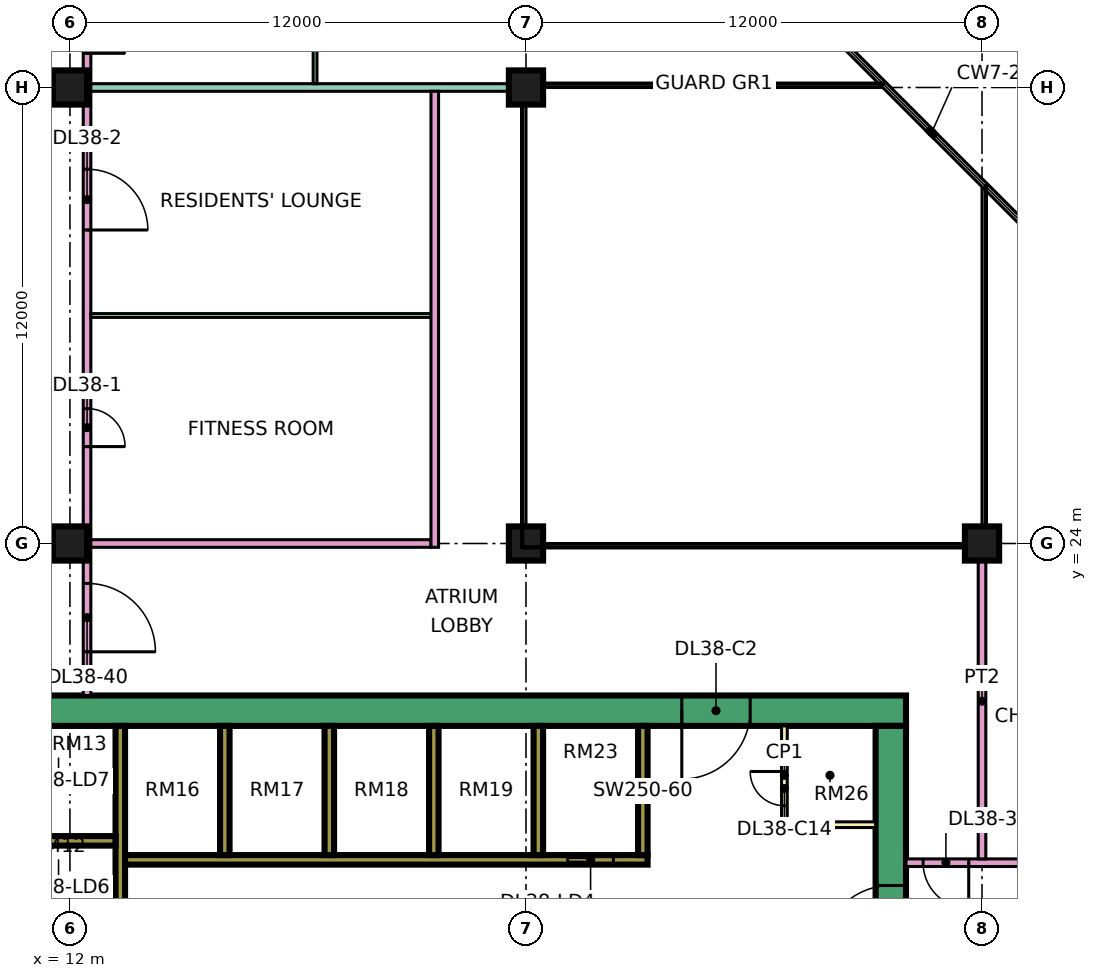
"""IFC4 building model, lengths in metres.
Left out: names, types, materials, properties, quantities, classifications, styles, units other than length and angle.
Written with IfcOpenShell. Run it as: python <this file> out.ifc"""

import sys

from ifc_helpers import new_model, si_unit, direction, frame, frame_2d, origin, origin_2d, place, context, subcontext, project, spatial, rectangle, extrude, element, fill, save


model = new_model("IFC4")
c1 = context("Model", 3, precision=1e-05, world=origin(), true_north=direction((0.0, 1.0)))
c2 = subcontext(c1, "Body", "Model", "MODEL_VIEW")
j1 = project(units=[si_unit("LENGTHUNIT", "METRE"), si_unit("PLANEANGLEUNIT", "RADIAN")], contexts=[c1])
p1 = place(None, origin())
s1 = spatial("IfcSite", under=j1, at=p1, CompositionType="ELEMENT")
p2 = place(p1, origin())
s2 = spatial("IfcBuilding", under=s1, at=p2, CompositionType="ELEMENT")
p3 = place(p2, frame((0.0, 0.0, 168.65)))
s3 = spatial("IfcBuildingStorey", under=s2, at=p3, CompositionType="ELEMENT", Elevation=168.65)
for number, where, z_axis, x_axis in (
    (1, (12.0, 24.0, 0.0), (0.0, 0.0, 1.0), (1.0, 0.0, 0.0)),
    (2, (12.0, 36.0, 0.0), (0.0, 0.0, 1.0), (1.0, 0.0, 0.0)),
    (3, (24.0, 24.0, 0.0), (0.0, 0.0, 1.0), (1.0, 0.0, 0.0)),
    (4, (24.0, 36.0, 0.0), (0.0, 0.0, 1.0), (1.0, 0.0, 0.0)),
    (5, (36.0, 24.0, 0.0), (0.0, 0.0, 1.0), (1.0, 0.0, 0.0)),
):
    element("IfcColumn", number, at=place(p3, frame(where, z_axis=z_axis, x_axis=x_axis)), inside=s3, PredefinedType="COLUMN", context=c2, shape_type="SweptSolid", body=[
        extrude(rectangle(XDim=0.9, YDim=0.9, at=origin_2d()), origin(), (0.0, 0.0, 1.0), 3.75),
    ])
p4 = place(p3, frame((9.0, 19.6, 0.0), z_axis=(0.0, 0.0, 1.0), x_axis=(1.0, 0.0, 0.0)))
e6 = element("IfcWall", 6, at=p4, inside=s3, PredefinedType="SHEAR", context=c2, shape_type="SweptSolid", body=[
    extrude(rectangle(XDim=25.0, YDim=0.8, at=frame_2d((12.5, 0.0))), origin(), (0.0, 0.0, 1.0), 3.75),
])
p5 = place(p4, frame((19.1, 0.0, 0.0)))
e7 = element("IfcOpeningElement", 7, at=p5, cuts=e6, PredefinedType="OPENING", context=c2, shape_type="SweptSolid", body=[
    extrude(rectangle(XDim=1.8, YDim=2.4, at=frame_2d((0.9, 1.2))), frame((0.0, 0.41, 0.0), z_axis=(0.0, -1.0, 0.0), x_axis=(1.0, 0.0, 0.0)), (0.0, 0.0, 1.0), 0.82),
])
p6 = place(p3, frame((33.6, 7.8, 0.0), z_axis=(0.0, 0.0, 1.0), x_axis=(0.0, 1.0, 0.0)))
e8 = element("IfcWall", 8, at=p6, inside=s3, PredefinedType="SHEAR", context=c2, shape_type="SweptSolid", body=[
    extrude(rectangle(XDim=11.4, YDim=0.8, at=frame_2d((5.7, 0.0))), origin(), (0.0, 0.0, 1.0), 3.75),
])
p7 = place(p6, frame((5.4, 0.0, 0.0)))
e9 = element("IfcOpeningElement", 9, at=p7, cuts=e8, PredefinedType="OPENING", context=c2, shape_type="SweptSolid", body=[
    extrude(rectangle(XDim=1.8, YDim=2.4, at=frame_2d((0.9, 1.2))), frame((0.0, 0.41, 0.0), z_axis=(0.0, -1.0, 0.0), x_axis=(1.0, 0.0, 0.0)), (0.0, 0.0, 1.0), 0.82),
])
p8 = place(p3, frame((13.325, 7.8, 0.0), z_axis=(0.0, 0.0, 1.0), x_axis=(0.0, 1.0, 0.0)))
e10 = element("IfcWall", 10, at=p8, inside=s3, PredefinedType="SHEAR", context=c2, shape_type="SweptSolid", body=[
    extrude(rectangle(XDim=11.4, YDim=0.25, at=frame_2d((5.7, 0.0))), origin(), (0.0, 0.0, 1.0), 3.75),
])
p9 = place(p3, frame((13.45, 15.675, 0.0), z_axis=(0.0, 0.0, 1.0), x_axis=(1.0, 0.0, 0.0)))
e11 = element("IfcWall", 11, at=p9, inside=s3, PredefinedType="SHEAR", context=c2, shape_type="SweptSolid", body=[
    extrude(rectangle(XDim=13.75, YDim=0.25, at=frame_2d((6.875, 0.0))), origin(), (0.0, 0.0, 1.0), 3.75),
])
p10 = place(p9, frame((11.65, 0.0, 0.0)))
e12 = element("IfcOpeningElement", 12, at=p10, cuts=e11, PredefinedType="OPENING", context=c2, shape_type="SweptSolid", body=[
    extrude(rectangle(XDim=1.2, YDim=2.2, at=frame_2d((0.6, 1.1))), frame((0.0, 0.135, 0.0), z_axis=(0.0, -1.0, 0.0), x_axis=(1.0, 0.0, 0.0)), (0.0, 0.0, 1.0), 0.27),
])
p11 = place(p3, frame((10.2, 16.175, 0.0), z_axis=(0.0, 0.0, 1.0), x_axis=(1.0, 0.0, 0.0)))
e13 = element("IfcWall", 13, at=p11, inside=s3, PredefinedType="SHEAR", context=c2, shape_type="SweptSolid", body=[
    extrude(rectangle(XDim=3.0, YDim=0.25, at=frame_2d((1.5, 0.0))), origin(), (0.0, 0.0, 1.0), 3.75),
])
for number, where, z_axis, x_axis in (
    (14, (16.075, 15.8, 0.0), (0.0, 0.0, 1.0), (0.0, 1.0, 0.0)),
    (15, (18.825, 15.8, 0.0), (0.0, 0.0, 1.0), (0.0, 1.0, 0.0)),
    (16, (21.575, 15.8, 0.0), (0.0, 0.0, 1.0), (0.0, 1.0, 0.0)),
    (17, (24.325, 15.8, 0.0), (0.0, 0.0, 1.0), (0.0, 1.0, 0.0)),
    (18, (27.075, 15.8, 0.0), (0.0, 0.0, 1.0), (0.0, 1.0, 0.0)),
):
    element("IfcWall", number, at=place(p3, frame(where, z_axis=z_axis, x_axis=x_axis)), inside=s3, PredefinedType="SHEAR", context=c2, shape_type="SweptSolid", body=[
        extrude(rectangle(XDim=3.4, YDim=0.25, at=frame_2d((1.7, 0.0))), origin(), (0.0, 0.0, 1.0), 3.75),
    ])
p12 = place(p3, frame((30.8, 16.6, 0.0), z_axis=(0.0, 0.0, 1.0), x_axis=(0.0, 1.0, 0.0)))
e19 = element("IfcWall", 19, at=p12, inside=s3, PredefinedType="PARTITIONING", context=c2, shape_type="SweptSolid", body=[
    extrude(rectangle(XDim=2.6, YDim=0.15, at=frame_2d((1.3, 0.0))), origin(), (0.0, 0.0, 1.0), 3.35),
])
p13 = place(p12, frame((0.5, 0.0, 0.0)))
e20 = element("IfcOpeningElement", 20, at=p13, cuts=e19, PredefinedType="OPENING", context=c2, shape_type="SweptSolid", body=[
    extrude(rectangle(XDim=0.9, YDim=2.1, at=frame_2d((0.45, 1.05))), frame((0.0, 0.085, 0.0), z_axis=(0.0, -1.0, 0.0), x_axis=(1.0, 0.0, 0.0)), (0.0, 0.0, 1.0), 0.17),
])
p14 = place(p3, frame((30.8, 16.6, 0.0), z_axis=(0.0, 0.0, 1.0), x_axis=(1.0, 0.0, 0.0)))
e21 = element("IfcWall", 21, at=p14, inside=s3, PredefinedType="PARTITIONING", context=c2, shape_type="SweptSolid", body=[
    extrude(rectangle(XDim=2.4, YDim=0.15, at=frame_2d((1.2, 0.0))), origin(), (0.0, 0.0, 1.0), 3.35),
])
p15 = place(p3, frame((12.45, 20.0, 0.0), z_axis=(0.0, 0.0, 1.0), x_axis=(0.0, 1.0, 0.0)))
e22 = element("IfcWall", 22, at=p15, inside=s3, PredefinedType="PARTITIONING", context=c2, shape_type="SweptSolid", body=[
    extrude(rectangle(XDim=42.926, YDim=0.2, at=frame_2d((21.463, 0.0))), origin(), (0.0, 0.0, 1.0), 3.35),
])
p16 = place(p15, frame((6.55, 0.0, 0.0)))
e23 = element("IfcOpeningElement", 23, at=p16, cuts=e22, PredefinedType="OPENING", context=c2, shape_type="SweptSolid", body=[
    extrude(rectangle(XDim=1.0, YDim=2.1, at=frame_2d((0.5, 1.05))), frame((0.0, 0.11, 0.0), z_axis=(0.0, -1.0, 0.0), x_axis=(1.0, 0.0, 0.0)), (0.0, 0.0, 1.0), 0.22),
])
p17 = place(p15, frame((12.25, 0.0, 0.0)))
e24 = element("IfcOpeningElement", 24, at=p17, cuts=e22, PredefinedType="OPENING", context=c2, shape_type="SweptSolid", body=[
    extrude(rectangle(XDim=1.6, YDim=2.1, at=frame_2d((0.8, 1.05))), frame((0.0, 0.11, 0.0), z_axis=(0.0, -1.0, 0.0), x_axis=(1.0, 0.0, 0.0)), (0.0, 0.0, 1.0), 0.22),
])
p18 = place(p15, frame((16.9, 0.0, 0.0)))
e25 = element("IfcOpeningElement", 25, at=p18, cuts=e22, PredefinedType="OPENING", context=c2, shape_type="SweptSolid", body=[
    extrude(rectangle(XDim=1.0, YDim=2.1, at=frame_2d((0.5, 1.05))), frame((0.0, 0.11, 0.0), z_axis=(0.0, -1.0, 0.0), x_axis=(1.0, 0.0, 0.0)), (0.0, 0.0, 1.0), 0.22),
])
p19 = place(p15, frame((40.9, 0.0, 0.0)))
e26 = element("IfcOpeningElement", 26, at=p19, cuts=e22, PredefinedType="OPENING", context=c2, shape_type="SweptSolid", body=[
    extrude(rectangle(XDim=1.0, YDim=2.1, at=frame_2d((0.5, 1.05))), frame((0.0, 0.11, 0.0), z_axis=(0.0, -1.0, 0.0), x_axis=(1.0, 0.0, 0.0)), (0.0, 0.0, 1.0), 0.22),
])
p20 = place(p15, frame((1.15, 0.0, 0.0)))
e27 = element("IfcOpeningElement", 27, at=p20, cuts=e22, PredefinedType="OPENING", context=c2, shape_type="SweptSolid", body=[
    extrude(rectangle(XDim=1.8, YDim=2.1, at=frame_2d((0.9, 1.05))), frame((0.0, 0.11, 0.0), z_axis=(0.0, -1.0, 0.0), x_axis=(1.0, 0.0, 0.0)), (0.0, 0.0, 1.0), 0.22),
])
p21 = place(p15, frame((28.6, 0.0, 0.0)))
e28 = element("IfcOpeningElement", 28, at=p21, cuts=e22, PredefinedType="OPENING", context=c2, shape_type="SweptSolid", body=[
    extrude(rectangle(XDim=1.8, YDim=2.1, at=frame_2d((0.9, 1.05))), frame((0.0, 0.11, 0.0), z_axis=(0.0, -1.0, 0.0), x_axis=(1.0, 0.0, 0.0)), (0.0, 0.0, 1.0), 0.22),
])
p22 = place(p3, frame((12.55, 24.0, 0.0), z_axis=(0.0, 0.0, 1.0), x_axis=(1.0, 0.0, 0.0)))
e29 = element("IfcWall", 29, at=p22, inside=s3, PredefinedType="PARTITIONING", context=c2, shape_type="SweptSolid", body=[
    extrude(rectangle(XDim=8.95, YDim=0.2, at=frame_2d((4.475, 0.0))), origin(), (0.0, 0.0, 1.0), 3.35),
])
p23 = place(p3, frame((12.55, 30.0, 0.0), z_axis=(0.0, 0.0, 1.0), x_axis=(1.0, 0.0, 0.0)))
e30 = element("IfcWall", 30, at=p23, inside=s3, PredefinedType="PARTITIONING", context=c2, shape_type="SweptSolid", body=[
    extrude(rectangle(XDim=8.95, YDim=0.1, at=frame_2d((4.475, 0.0))), origin(), (0.0, 0.0, 1.0), 3.35),
])
p24 = place(p3, frame((12.55, 36.0, 0.0), z_axis=(0.0, 0.0, 1.0), x_axis=(1.0, 0.0, 0.0)))
e31 = element("IfcWall", 31, at=p24, inside=s3, PredefinedType="PARTITIONING", context=c2, shape_type="SweptSolid", body=[
    extrude(rectangle(XDim=11.45, YDim=0.2, at=frame_2d((5.725, 0.0))), origin(), (0.0, 0.0, 1.0), 3.35),
])
p25 = place(p3, frame((18.45, 36.1, 0.0), z_axis=(0.0, 0.0, 1.0), x_axis=(0.0, 1.0, 0.0)))
e32 = element("IfcWall", 32, at=p25, inside=s3, PredefinedType="PARTITIONING", context=c2, shape_type="SweptSolid", body=[
    extrude(rectangle(XDim=5.95, YDim=0.1, at=frame_2d((2.975, 0.0))), origin(), (0.0, 0.0, 1.0), 3.35),
])
p26 = place(p25, frame((0.95, 0.0, 0.0)))
e33 = element("IfcOpeningElement", 33, at=p26, cuts=e32, PredefinedType="OPENING", context=c2, shape_type="SweptSolid", body=[
    extrude(rectangle(XDim=0.9, YDim=2.1, at=frame_2d((0.45, 1.05))), frame((0.0, 0.06, 0.0), z_axis=(0.0, -1.0, 0.0), x_axis=(1.0, 0.0, 0.0)), (0.0, 0.0, 1.0), 0.12),
])
p27 = place(p25, frame((3.95, 0.0, 0.0)))
e34 = element("IfcOpeningElement", 34, at=p27, cuts=e32, PredefinedType="OPENING", context=c2, shape_type="SweptSolid", body=[
    extrude(rectangle(XDim=0.9, YDim=2.1, at=frame_2d((0.45, 1.05))), frame((0.0, 0.06, 0.0), z_axis=(0.0, -1.0, 0.0), x_axis=(1.0, 0.0, 0.0)), (0.0, 0.0, 1.0), 0.12),
])
p28 = place(p3, frame((21.6, 23.9, 0.0), z_axis=(0.0, 0.0, 1.0), x_axis=(0.0, 1.0, 0.0)))
e35 = element("IfcWall", 35, at=p28, inside=s3, PredefinedType="PARTITIONING", context=c2, shape_type="SweptSolid", body=[
    extrude(rectangle(XDim=12.0, YDim=0.2, at=frame_2d((6.0, 0.0))), origin(), (0.0, 0.0, 1.0), 3.35),
])
p29 = place(p3, frame((34.0, 15.6, 0.0), z_axis=(0.0, 0.0, 1.0), x_axis=(1.0, 0.0, 0.0)))
e36 = element("IfcWall", 36, at=p29, inside=s3, PredefinedType="PARTITIONING", context=c2, shape_type="SweptSolid", body=[
    extrude(rectangle(XDim=10.35, YDim=0.2, at=frame_2d((5.175, 0.0))), origin(), (0.0, 0.0, 1.0), 3.35),
])
p30 = place(p29, frame((5.6, 0.0, 0.0)))
e37 = element("IfcOpeningElement", 37, at=p30, cuts=e36, PredefinedType="OPENING", context=c2, shape_type="SweptSolid", body=[
    extrude(rectangle(XDim=1.0, YDim=2.1, at=frame_2d((0.5, 1.05))), frame((0.0, 0.11, 0.0), z_axis=(0.0, -1.0, 0.0), x_axis=(1.0, 0.0, 0.0)), (0.0, 0.0, 1.0), 0.22),
])
p31 = place(p29, frame((0.45, 0.0, 0.0)))
e38 = element("IfcOpeningElement", 38, at=p31, cuts=e36, PredefinedType="OPENING", context=c2, shape_type="SweptSolid", body=[
    extrude(rectangle(XDim=1.2, YDim=2.1, at=frame_2d((0.6, 1.05))), frame((0.0, 0.11, 0.0), z_axis=(0.0, -1.0, 0.0), x_axis=(1.0, 0.0, 0.0)), (0.0, 0.0, 1.0), 0.22),
])
p32 = place(p3, frame((36.0, 15.7, 0.0), z_axis=(0.0, 0.0, 1.0), x_axis=(0.0, 1.0, 0.0)))
e39 = element("IfcWall", 39, at=p32, inside=s3, PredefinedType="PARTITIONING", context=c2, shape_type="SweptSolid", body=[
    extrude(rectangle(XDim=8.3, YDim=0.2, at=frame_2d((4.15, 0.0))), origin(), (0.0, 0.0, 1.0), 3.35),
])
p33 = place(p10, origin())
e40 = element("IfcDoor", 40, at=p33, inside=s3, OperationType="DOUBLE_DOOR_SLIDING", PredefinedType="DOOR", context=c2, shape_type="SweptSolid", body=[
    extrude(rectangle(XDim=1.2, YDim=2.2, at=frame_2d((0.6, 1.1))), frame((0.0, 0.025, 0.0), z_axis=(0.0, -1.0, 0.0), x_axis=(1.0, 0.0, 0.0)), (0.0, 0.0, 1.0), 0.05),
])
fill(e12, e40)
p34 = place(p7, origin())
e41 = element("IfcDoor", 41, at=p34, inside=s3, OperationType="DOUBLE_DOOR_SINGLE_SWING", PredefinedType="DOOR", context=c2, shape_type="SweptSolid", body=[
    extrude(rectangle(XDim=1.8, YDim=2.4, at=frame_2d((0.9, 1.2))), frame((0.0, 0.025, 0.0), z_axis=(0.0, -1.0, 0.0), x_axis=(1.0, 0.0, 0.0)), (0.0, 0.0, 1.0), 0.05),
])
fill(e9, e41)
p35 = place(p5, frame((1.8, 0.0, 0.0), z_axis=(0.0, 0.0, 1.0), x_axis=(-1.0, 0.0, 0.0)))
e42 = element("IfcDoor", 42, at=p35, inside=s3, OperationType="DOUBLE_DOOR_SINGLE_SWING", PredefinedType="DOOR", context=c2, shape_type="SweptSolid", body=[
    extrude(rectangle(XDim=1.8, YDim=2.4, at=frame_2d((0.9, 1.2))), frame((0.0, 0.025, 0.0), z_axis=(0.0, -1.0, 0.0), x_axis=(1.0, 0.0, 0.0)), (0.0, 0.0, 1.0), 0.05),
])
fill(e7, e42)
p36 = place(p13, frame((0.9, 0.0, 0.0), z_axis=(0.0, 0.0, 1.0), x_axis=(-1.0, 0.0, 0.0)))
e43 = element("IfcDoor", 43, at=p36, inside=s3, OperationType="SINGLE_SWING_RIGHT", PredefinedType="DOOR", context=c2, shape_type="SweptSolid", body=[
    extrude(rectangle(XDim=0.9, YDim=2.1, at=frame_2d((0.45, 1.05))), frame((0.0, 0.025, 0.0), z_axis=(0.0, -1.0, 0.0), x_axis=(1.0, 0.0, 0.0)), (0.0, 0.0, 1.0), 0.05),
])
fill(e20, e43)
p37 = place(p16, frame((1.0, 0.0, 0.0), z_axis=(0.0, 0.0, 1.0), x_axis=(-1.0, 0.0, 0.0)))
e44 = element("IfcDoor", 44, at=p37, inside=s3, OperationType="SINGLE_SWING_LEFT", PredefinedType="DOOR", context=c2, shape_type="SweptSolid", body=[
    extrude(rectangle(XDim=1.0, YDim=2.1, at=frame_2d((0.5, 1.05))), frame((0.0, 0.025, 0.0), z_axis=(0.0, -1.0, 0.0), x_axis=(1.0, 0.0, 0.0)), (0.0, 0.0, 1.0), 0.05),
])
fill(e23, e44)
p38 = place(p17, frame((1.6, 0.0, 0.0), z_axis=(0.0, 0.0, 1.0), x_axis=(-1.0, 0.0, 0.0)))
e45 = element("IfcDoor", 45, at=p38, inside=s3, OperationType="DOUBLE_DOOR_SINGLE_SWING", PredefinedType="DOOR", context=c2, shape_type="SweptSolid", body=[
    extrude(rectangle(XDim=1.6, YDim=2.1, at=frame_2d((0.8, 1.05))), frame((0.0, 0.025, 0.0), z_axis=(0.0, -1.0, 0.0), x_axis=(1.0, 0.0, 0.0)), (0.0, 0.0, 1.0), 0.05),
])
fill(e24, e45)
p39 = place(p18, frame((1.0, 0.0, 0.0), z_axis=(0.0, 0.0, 1.0), x_axis=(-1.0, 0.0, 0.0)))
e46 = element("IfcDoor", 46, at=p39, inside=s3, OperationType="SINGLE_SWING_LEFT", PredefinedType="DOOR", context=c2, shape_type="SweptSolid", body=[
    extrude(rectangle(XDim=1.0, YDim=2.1, at=frame_2d((0.5, 1.05))), frame((0.0, 0.025, 0.0), z_axis=(0.0, -1.0, 0.0), x_axis=(1.0, 0.0, 0.0)), (0.0, 0.0, 1.0), 0.05),
])
fill(e25, e46)
p40 = place(p31, origin())
e47 = element("IfcDoor", 47, at=p40, inside=s3, OperationType="SINGLE_SWING_RIGHT", PredefinedType="DOOR", context=c2, shape_type="SweptSolid", body=[
    extrude(rectangle(XDim=1.2, YDim=2.1, at=frame_2d((0.6, 1.05))), frame((0.0, 0.025, 0.0), z_axis=(0.0, -1.0, 0.0), x_axis=(1.0, 0.0, 0.0)), (0.0, 0.0, 1.0), 0.05),
])
fill(e38, e47)
p41 = place(p20, frame((1.8, 0.0, 0.0), z_axis=(0.0, 0.0, 1.0), x_axis=(-1.0, 0.0, 0.0)))
e48 = element("IfcDoor", 48, at=p41, inside=s3, OperationType="DOUBLE_DOOR_SINGLE_SWING", PredefinedType="DOOR", context=c2, shape_type="SweptSolid", body=[
    extrude(rectangle(XDim=1.8, YDim=2.1, at=frame_2d((0.9, 1.05))), frame((0.0, 0.025, 0.0), z_axis=(0.0, -1.0, 0.0), x_axis=(1.0, 0.0, 0.0)), (0.0, 0.0, 1.0), 0.05),
])
fill(e27, e48)
save(model, sys.argv[1])
